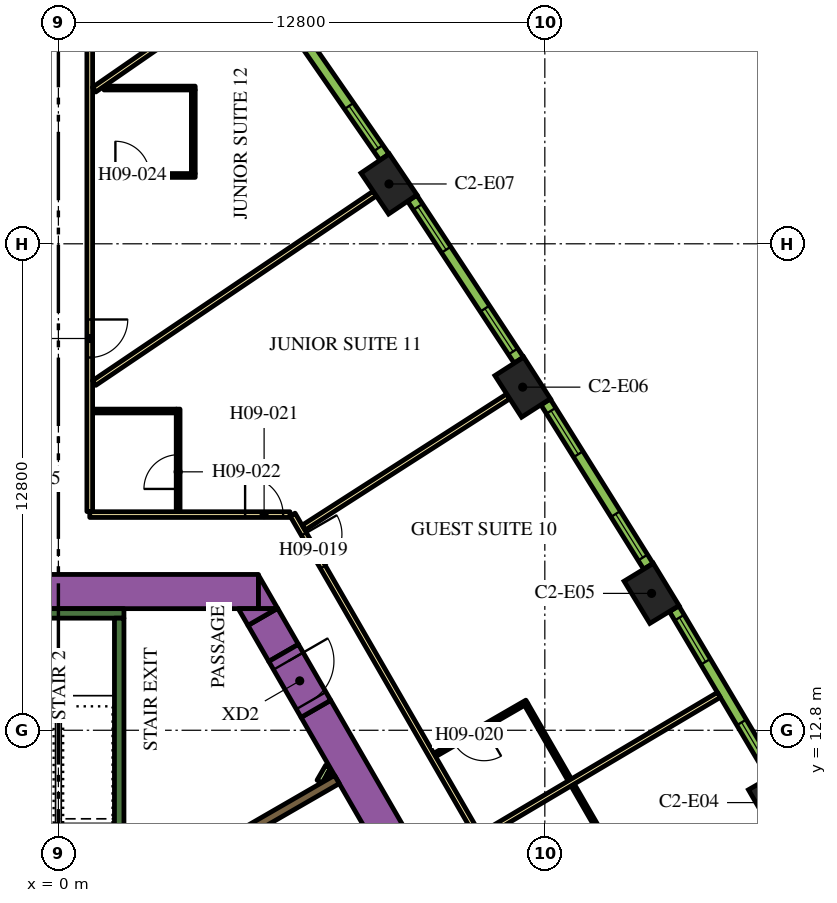
"""IFC4 building model, lengths in metres.
Left out: names, types, materials, properties, quantities, classifications, styles, units other than length and angle.
Written with IfcOpenShell. Run it as: python <this file> out.ifc"""

import sys

from ifc_helpers import new_model, si_unit, direction, frame, frame_2d, origin, origin_2d, place, context, subcontext, project, spatial, polyline, rectangle, outline, extrude, element, fill, save


model = new_model("IFC4")
c1 = context("Model", 3, precision=1e-05, world=origin(), true_north=direction((0.0, 1.0)))
c2 = subcontext(c1, "Body", "Model", "MODEL_VIEW")
j1 = project(units=[si_unit("LENGTHUNIT", "METRE"), si_unit("PLANEANGLEUNIT", "RADIAN")], contexts=[c1])
p1 = place(None, origin())
s1 = spatial("IfcSite", under=j1, at=p1, CompositionType="ELEMENT")
p2 = place(p1, origin())
s2 = spatial("IfcBuilding", under=s1, at=p2, CompositionType="ELEMENT")
p3 = place(p2, frame((0.0, 0.0, 118.8)))
s3 = spatial("IfcBuildingStorey", under=s2, at=p3, CompositionType="ELEMENT", Elevation=118.8)
for number, where, z_axis, x_axis in (
    (1, (18.874, 10.897, 0.0), (0.0, 0.0, 1.0), (-0.5, 0.866, 0.0)),
    (2, (15.609, 16.402, 0.0), (0.0, 0.0, 1.0), (-0.52, 0.854, 0.0)),
    (3, (12.217, 21.828, 0.0), (0.0, 0.0, 1.0), (-0.54, 0.842, 0.0)),
    (4, (8.699, 27.174, 0.0), (0.0, 0.0, 1.0), (-0.559, 0.829, 0.0)),
):
    element("IfcColumn", number, at=place(p3, frame(where, z_axis=z_axis, x_axis=x_axis)), inside=s3, PredefinedType="COLUMN", context=c2, shape_type="SweptSolid", body=[
        extrude(rectangle(XDim=1.3, YDim=0.9, at=origin_2d()), origin(), (0.0, 0.0, 1.0), 3.9),
    ])
p4 = place(p3, frame((6.776, 13.364, 0.0), z_axis=(0.0, 0.0, 1.0), x_axis=(0.500004177138, -0.8660229921, 0.0)))
e5 = element("IfcWall", 5, at=p4, inside=s3, PredefinedType="SOLIDWALL", context=c2, shape_type="SweptSolid", body=[
    extrude(rectangle(XDim=20.204, YDim=0.9, at=frame_2d((10.102, 0.0))), origin(), (0.0, 0.0, 1.0), 3.9),
])
p5 = place(p3, frame((-4.224, 16.45, 0.0), z_axis=(0.0, 0.0, 1.0), x_axis=(1.0, 0.0, 0.0)))
e6 = element("IfcWall", 6, at=p5, inside=s3, PredefinedType="SOLIDWALL", context=c2, shape_type="SweptSolid", body=[
    extrude(rectangle(XDim=9.488, YDim=0.9, at=frame_2d((4.744, 0.0))), origin(), (0.0, 0.0, 1.0), 3.9),
])
p6 = place(p3, origin())
e7 = element("IfcWall", 7, at=p6, inside=s3, PredefinedType="SOLIDWALL", context=c2, shape_type="SweptSolid", body=[
    extrude(outline(polyline([(5.265, 16.0), (5.265, 16.88), (5.773, 16.0), (5.265, 16.0)])), origin(), (0.0, 0.0, 1.0), 3.9),
])
p7 = place(p3, frame((5.926, 14.836, 0.0), z_axis=(0.0, 0.0, 1.0), x_axis=(-0.500076735116, 0.865981096212, 0.0)))
e8 = element("IfcWall", 8, at=p7, inside=s3, PredefinedType="SOLIDWALL", context=c2, shape_type="SweptSolid", body=[
    extrude(rectangle(XDim=1.094, YDim=0.9, at=frame_2d((0.547, 0.0))), origin(), (0.0, 0.0, 1.0), 3.9),
])
e9 = element("IfcWall", 9, at=p6, inside=s3, PredefinedType="SOLIDWALL", context=c2, shape_type="SweptSolid", body=[
    extrude(outline(polyline([(4.734, 16.0), (5.75, 16.0), (4.988, 15.56), (4.734, 16.0)])), origin(), (0.0, 0.0, 1.0), 3.9),
])
p8 = place(p3, frame((-1.725, 15.875, 0.0), z_axis=(0.0, 0.0, 1.0), x_axis=(1.0, 0.0, 0.0)))
e10 = element("IfcWall", 10, at=p8, inside=s3, PredefinedType="SOLIDWALL", context=c2, shape_type="SweptSolid", body=[
    extrude(rectangle(XDim=3.45, YDim=0.25, at=frame_2d((1.725, 0.0))), origin(), (0.0, 0.0, 1.0), 3.9),
])
p9 = place(p3, frame((1.6, 8.95, 0.0), z_axis=(0.0, 0.0, 1.0), x_axis=(0.0, 1.0, 0.0)))
e11 = element("IfcWall", 11, at=p9, inside=s3, PredefinedType="SOLIDWALL", context=c2, shape_type="SweptSolid", body=[
    extrude(rectangle(XDim=6.8, YDim=0.25, at=frame_2d((3.4, 0.0))), origin(), (0.0, 0.0, 1.0), 3.9),
])
e12 = element("IfcWall", 12, at=p6, inside=s3, PredefinedType="SOLIDWALL", context=c2, shape_type="SweptSolid", body=[
    extrude(outline(polyline([(5.27, 10.173), (5.27, 10.173), (4.683, 9.834), (4.504, 9.731), (4.442, 9.839), (4.431, 9.856), (4.419, 9.871), (4.406, 9.885), (4.39, 9.898), (4.374, 9.909), (4.357, 9.918), (4.341, 9.925), (7.266, 11.614), (7.391, 11.398), (5.486, 10.298), (5.486, 10.298), (5.27, 10.173), (5.27, 10.173)])), origin(), (0.0, 0.0, 1.0), 3.9),
])
p10 = place(p3, frame((6.872, 11.45, 0.0), z_axis=(0.0, 0.0, 1.0), x_axis=(0.499846793097, 0.866113839764, 0.0)))
e13 = element("IfcWall", 13, at=p10, inside=s3, PredefinedType="PARTITIONING", context=c2, shape_type="SweptSolid", body=[
    extrude(rectangle(XDim=0.453, YDim=0.15, at=frame_2d((0.227, 0.0))), origin(), (0.0, 0.0, 1.0), 2.75),
])
p11 = place(p3, frame((7.131, 11.6, 0.0), z_axis=(0.0, 0.0, 1.0), x_axis=(0.498600033135, 0.866832167699, 0.0)))
e14 = element("IfcWall", 14, at=p11, inside=s3, PredefinedType="PARTITIONING", context=c2, shape_type="SweptSolid", body=[
    extrude(rectangle(XDim=0.107, YDim=0.15, at=frame_2d((0.053, 0.0))), origin(), (0.0, 0.0, 1.0), 2.75),
])
p12 = place(p3, frame((5.926, 14.836, 0.0), z_axis=(0.0, 0.0, 1.0), x_axis=(0.500062241894, -0.865989465428, 0.0)))
e15 = element("IfcWall", 15, at=p12, inside=s3, PredefinedType="SOLIDWALL", context=c2, shape_type="SweptSolid", body=[
    extrude(rectangle(XDim=1.7, YDim=0.9, at=frame_2d((0.85, 0.0))), origin(), (0.0, 0.0, 1.0), 3.9),
])
p13 = place(p12, frame((0.25, 0.0, 0.0)))
e16 = element("IfcOpeningElement", 16, at=p13, cuts=e15, PredefinedType="OPENING", context=c2, shape_type="SweptSolid", body=[
    extrude(rectangle(XDim=1.2, YDim=2.1, at=frame_2d((0.6, 1.05))), frame((0.0, 0.46, 0.0), z_axis=(0.0, -1.0, 0.0), x_axis=(1.0, 0.0, 0.0)), (0.0, 0.0, 1.0), 0.92),
])
p14 = place(p3, frame((6.163, 18.475, 0.0), z_axis=(0.0, 0.0, 1.0), x_axis=(0.500001317485, -0.866024643133, 0.0)))
e17 = element("IfcWall", 17, at=p14, inside=s3, PredefinedType="PARTITIONING", context=c2, shape_type="SweptSolid", body=[
    extrude(rectangle(XDim=25.767, YDim=0.15, at=frame_2d((12.883, 0.0))), origin(), (0.0, 0.0, 1.0), 2.75),
])
p15 = place(p14, frame((19.306, 0.0, 0.0)))
e18 = element("IfcOpeningElement", 18, at=p15, cuts=e17, PredefinedType="OPENING", context=c2, shape_type="SweptSolid", body=[
    extrude(rectangle(XDim=1.0, YDim=2.1, at=frame_2d((0.5, 1.05))), frame((0.0, 0.085, 0.0), z_axis=(0.0, -1.0, 0.0), x_axis=(1.0, 0.0, 0.0)), (0.0, 0.0, 1.0), 0.17),
])
p16 = place(p14, frame((17.999, 0.0, 0.0)))
e19 = element("IfcOpeningElement", 19, at=p16, cuts=e17, PredefinedType="OPENING", context=c2, shape_type="SweptSolid", body=[
    extrude(rectangle(XDim=1.0, YDim=2.1, at=frame_2d((0.5, 1.05))), frame((0.0, 0.085, 0.0), z_axis=(0.0, -1.0, 0.0), x_axis=(1.0, 0.0, 0.0)), (0.0, 0.0, 1.0), 0.17),
])
p17 = place(p14, frame((0.596, 0.0, 0.0)))
e20 = element("IfcOpeningElement", 20, at=p17, cuts=e17, PredefinedType="OPENING", context=c2, shape_type="SweptSolid", body=[
    extrude(rectangle(XDim=1.0, YDim=2.1, at=frame_2d((0.5, 1.05))), frame((0.0, 0.085, 0.0), z_axis=(0.0, -1.0, 0.0), x_axis=(1.0, 0.0, 0.0)), (0.0, 0.0, 1.0), 0.17),
])
p18 = place(p3, frame((0.825, 18.475, 0.0), z_axis=(0.0, 0.0, 1.0), x_axis=(1.0, 0.0, 0.0)))
e21 = element("IfcWall", 21, at=p18, inside=s3, PredefinedType="PARTITIONING", context=c2, shape_type="SweptSolid", body=[
    extrude(rectangle(XDim=5.268, YDim=0.15, at=frame_2d((2.634, 0.0))), origin(), (0.0, 0.0, 1.0), 2.75),
])
p19 = place(p18, frame((4.088, 0.0, 0.0)))
e22 = element("IfcOpeningElement", 22, at=p19, cuts=e21, PredefinedType="OPENING", context=c2, shape_type="SweptSolid", body=[
    extrude(rectangle(XDim=1.0, YDim=2.1, at=frame_2d((0.5, 1.05))), frame((0.0, 0.085, 0.0), z_axis=(0.0, -1.0, 0.0), x_axis=(1.0, 0.0, 0.0)), (0.0, 0.0, 1.0), 0.17),
])
p20 = place(p3, frame((0.825, 32.098, 0.0), z_axis=(0.0, 0.0, 1.0), x_axis=(0.0, -1.0, 0.0)))
e23 = element("IfcWall", 23, at=p20, inside=s3, PredefinedType="PARTITIONING", context=c2, shape_type="SweptSolid", body=[
    extrude(rectangle(XDim=13.543, YDim=0.15, at=frame_2d((6.772, 0.0))), origin(), (0.0, 0.0, 1.0), 2.75),
])
p21 = place(p20, frame((8.49, 0.0, 0.0)))
e24 = element("IfcOpeningElement", 24, at=p21, cuts=e23, PredefinedType="OPENING", context=c2, shape_type="SweptSolid", body=[
    extrude(rectangle(XDim=1.0, YDim=2.1, at=frame_2d((0.5, 1.05))), frame((0.0, 0.085, 0.0), z_axis=(0.0, -1.0, 0.0), x_axis=(1.0, 0.0, 0.0)), (0.0, 0.0, 1.0), 0.17),
])
p22 = place(p3, frame((8.326, 26.923, 0.0), z_axis=(0.0, 0.0, 1.0), x_axis=(-0.828836601893, -0.5594907393, 0.0)))
e25 = element("IfcWall", 25, at=p22, inside=s3, PredefinedType="PARTITIONING", context=c2, shape_type="SweptSolid", body=[
    extrude(rectangle(XDim=8.909, YDim=0.15, at=frame_2d((4.455, 0.0))), origin(), (0.0, 0.0, 1.0), 2.75),
])
p23 = place(p3, frame((4.649, 32.223, 0.0), z_axis=(0.0, 0.0, 1.0), x_axis=(-0.822262349475, -0.569108626394, 0.0)))
e26 = element("IfcWall", 26, at=p23, inside=s3, PredefinedType="PARTITIONING", context=c2, shape_type="SweptSolid", body=[
    extrude(rectangle(XDim=4.51, YDim=0.15, at=frame_2d((2.255, 0.0))), origin(), (0.0, 0.0, 1.0), 2.75),
])
p24 = place(p3, frame((11.838, 21.585, 0.0), z_axis=(0.0, 0.0, 1.0), x_axis=(-0.841699322813, -0.539946525108, 0.0)))
e27 = element("IfcWall", 27, at=p24, inside=s3, PredefinedType="PARTITIONING", context=c2, shape_type="SweptSolid", body=[
    extrude(rectangle(XDim=6.392, YDim=0.15, at=frame_2d((3.196, 0.0))), origin(), (0.0, 0.0, 1.0), 2.75),
])
p25 = place(p3, frame((17.379, 13.731, 0.0), z_axis=(0.0, 0.0, 1.0), x_axis=(-0.860132461691, -0.510070728768, 0.0)))
e28 = element("IfcWall", 28, at=p25, inside=s3, PredefinedType="PARTITIONING", context=c2, shape_type="SweptSolid", body=[
    extrude(rectangle(XDim=7.257, YDim=0.15, at=frame_2d((3.628, 0.0))), origin(), (0.0, 0.0, 1.0), 2.75),
])
p26 = place(p3, frame((14.712, 9.318, 0.0), z_axis=(0.0, 0.0, 1.0), x_axis=(-0.50000006957, 0.866025363618, 0.0)))
e29 = element("IfcWall", 29, at=p26, inside=s3, PredefinedType="PARTITIONING", context=c2, shape_type="SweptSolid", body=[
    extrude(rectangle(XDim=2.36, YDim=0.1, at=frame_2d((1.18, 0.0))), origin(), (0.0, 0.0, 1.0), 2.75),
])
p27 = place(p3, frame((12.327, 13.549, 0.0), z_axis=(0.0, 0.0, 1.0), x_axis=(-0.866056369097, -0.49994636267, 0.0)))
e30 = element("IfcWall", 30, at=p27, inside=s3, PredefinedType="PARTITIONING", context=c2, shape_type="SweptSolid", body=[
    extrude(rectangle(XDim=2.8, YDim=0.1, at=frame_2d((1.4, 0.0))), origin(), (0.0, 0.0, 1.0), 2.75),
])
p28 = place(p27, frame((1.3, 0.0, 0.0)))
e31 = element("IfcOpeningElement", 31, at=p28, cuts=e30, PredefinedType="OPENING", context=c2, shape_type="SweptSolid", body=[
    extrude(rectangle(XDim=0.9, YDim=2.1, at=frame_2d((0.45, 1.05))), frame((0.0, 0.06, 0.0), z_axis=(0.0, -1.0, 0.0), x_axis=(1.0, 0.0, 0.0)), (0.0, 0.0, 1.0), 0.12),
])
p29 = place(p3, frame((12.309, 13.481, 0.0), z_axis=(0.0, 0.0, 1.0), x_axis=(0.499968531483, -0.866043571379, 0.0)))
e32 = element("IfcWall", 32, at=p29, inside=s3, PredefinedType="PARTITIONING", context=c2, shape_type="SweptSolid", body=[
    extrude(rectangle(XDim=2.29, YDim=0.1, at=frame_2d((1.145, 0.0))), origin(), (0.0, 0.0, 1.0), 2.75),
])
p30 = place(p3, frame((3.151, 18.55, 0.0), z_axis=(0.0, 0.0, 1.0), x_axis=(0.0, 1.0, 0.0)))
e33 = element("IfcWall", 33, at=p30, inside=s3, PredefinedType="PARTITIONING", context=c2, shape_type="SweptSolid", body=[
    extrude(rectangle(XDim=2.7, YDim=0.1, at=frame_2d((1.35, 0.0))), origin(), (0.0, 0.0, 1.0), 2.75),
])
p31 = place(p30, frame((0.6, 0.0, 0.0)))
e34 = element("IfcOpeningElement", 34, at=p31, cuts=e33, PredefinedType="OPENING", context=c2, shape_type="SweptSolid", body=[
    extrude(rectangle(XDim=0.9, YDim=2.1, at=frame_2d((0.45, 1.05))), frame((0.0, 0.06, 0.0), z_axis=(0.0, -1.0, 0.0), x_axis=(1.0, 0.0, 0.0)), (0.0, 0.0, 1.0), 0.12),
])
p32 = place(p3, frame((3.101, 21.2, 0.0), z_axis=(0.0, 0.0, 1.0), x_axis=(-1.0, 0.0, 0.0)))
e35 = element("IfcWall", 35, at=p32, inside=s3, PredefinedType="PARTITIONING", context=c2, shape_type="SweptSolid", body=[
    extrude(rectangle(XDim=2.2, YDim=0.1, at=frame_2d((1.1, 0.0))), origin(), (0.0, 0.0, 1.0), 2.75),
])
p33 = place(p3, frame((0.9, 27.398, 0.0), z_axis=(0.0, 0.0, 1.0), x_axis=(1.0, 0.0, 0.0)))
e36 = element("IfcWall", 36, at=p33, inside=s3, PredefinedType="PARTITIONING", context=c2, shape_type="SweptSolid", body=[
    extrude(rectangle(XDim=2.7, YDim=0.1, at=frame_2d((1.35, 0.0))), origin(), (0.0, 0.0, 1.0), 2.75),
])
p34 = place(p33, frame((0.6, 0.0, 0.0)))
e37 = element("IfcOpeningElement", 37, at=p34, cuts=e36, PredefinedType="OPENING", context=c2, shape_type="SweptSolid", body=[
    extrude(rectangle(XDim=0.9, YDim=2.1, at=frame_2d((0.45, 1.05))), frame((0.0, 0.06, 0.0), z_axis=(0.0, -1.0, 0.0), x_axis=(1.0, 0.0, 0.0)), (0.0, 0.0, 1.0), 0.12),
])
p35 = place(p3, frame((3.55, 27.448, 0.0), z_axis=(0.0, 0.0, 1.0), x_axis=(0.0, 1.0, 0.0)))
e38 = element("IfcWall", 38, at=p35, inside=s3, PredefinedType="PARTITIONING", context=c2, shape_type="SweptSolid", body=[
    extrude(rectangle(XDim=2.2, YDim=0.1, at=frame_2d((1.1, 0.0))), origin(), (0.0, 0.0, 1.0), 2.75),
])
p36 = place(p3, frame((1.2, 29.698, 0.0), z_axis=(0.0, 0.0, 1.0), x_axis=(1.0, 0.0, 0.0)))
e39 = element("IfcWall", 39, at=p36, inside=s3, PredefinedType="PARTITIONING", context=c2, shape_type="SweptSolid", body=[
    extrude(rectangle(XDim=2.4, YDim=0.1, at=frame_2d((1.2, 0.0))), origin(), (0.0, 0.0, 1.0), 2.75),
])
p37 = place(p3, frame((18.805, 11.611, 0.0), z_axis=(0.0, 0.0, 1.0), x_axis=(-0.510054281659, 0.860142214847, 0.0)))
e40 = element("IfcWall", 40, at=p37, inside=s3, PredefinedType="SOLIDWALL", context=c2, shape_type="SweptSolid", body=[
    extrude(rectangle(XDim=5.101, YDim=0.29, at=frame_2d((2.55, 0.0))), origin(), (0.0, 0.0, 1.0), 3.65),
])
p38 = place(p37, frame((0.273, 0.0, 0.9)))
e41 = element("IfcOpeningElement", 41, at=p38, cuts=e40, PredefinedType="OPENING", context=c2, shape_type="SweptSolid", body=[
    extrude(rectangle(XDim=1.35, YDim=2.15, at=frame_2d((0.675, 1.075))), frame((0.0, 0.155, 0.0), z_axis=(0.0, -1.0, 0.0), x_axis=(1.0, 0.0, 0.0)), (0.0, 0.0, 1.0), 0.31),
])
p39 = place(p37, frame((3.478, 0.0, 0.9)))
e42 = element("IfcOpeningElement", 42, at=p39, cuts=e40, PredefinedType="OPENING", context=c2, shape_type="SweptSolid", body=[
    extrude(rectangle(XDim=1.35, YDim=2.15, at=frame_2d((0.675, 1.075))), frame((0.0, 0.155, 0.0), z_axis=(0.0, -1.0, 0.0), x_axis=(1.0, 0.0, 0.0)), (0.0, 0.0, 1.0), 0.31),
])
p40 = place(p3, frame((15.524, 17.114, 0.0), z_axis=(0.0, 0.0, 1.0), x_axis=(-0.530072082134, 0.847952585787, 0.0)))
e43 = element("IfcWall", 43, at=p40, inside=s3, PredefinedType="SOLIDWALL", context=c2, shape_type="SweptSolid", body=[
    extrude(rectangle(XDim=5.1, YDim=0.29, at=frame_2d((2.55, 0.0))), origin(), (0.0, 0.0, 1.0), 3.65),
])
p41 = place(p40, frame((0.273, 0.0, 0.9)))
e44 = element("IfcOpeningElement", 44, at=p41, cuts=e43, PredefinedType="OPENING", context=c2, shape_type="SweptSolid", body=[
    extrude(rectangle(XDim=1.35, YDim=2.15, at=frame_2d((0.675, 1.075))), frame((0.0, 0.155, 0.0), z_axis=(0.0, -1.0, 0.0), x_axis=(1.0, 0.0, 0.0)), (0.0, 0.0, 1.0), 0.31),
])
p42 = place(p40, frame((3.478, 0.0, 0.9)))
e45 = element("IfcOpeningElement", 45, at=p42, cuts=e43, PredefinedType="OPENING", context=c2, shape_type="SweptSolid", body=[
    extrude(rectangle(XDim=1.35, YDim=2.15, at=frame_2d((0.675, 1.075))), frame((0.0, 0.155, 0.0), z_axis=(0.0, -1.0, 0.0), x_axis=(1.0, 0.0, 0.0)), (0.0, 0.0, 1.0), 0.31),
])
p43 = place(p3, frame((12.115, 22.539, 0.0), z_axis=(0.0, 0.0, 1.0), x_axis=(-0.549741341923, 0.835334937005, 0.0)))
e46 = element("IfcWall", 46, at=p43, inside=s3, PredefinedType="SOLIDWALL", context=c2, shape_type="SweptSolid", body=[
    extrude(rectangle(XDim=5.1, YDim=0.29, at=frame_2d((2.55, 0.0))), origin(), (0.0, 0.0, 1.0), 3.65),
])
p44 = place(p43, frame((0.273, 0.0, 0.9)))
e47 = element("IfcOpeningElement", 47, at=p44, cuts=e46, PredefinedType="OPENING", context=c2, shape_type="SweptSolid", body=[
    extrude(rectangle(XDim=1.35, YDim=2.15, at=frame_2d((0.675, 1.075))), frame((0.0, 0.155, 0.0), z_axis=(0.0, -1.0, 0.0), x_axis=(1.0, 0.0, 0.0)), (0.0, 0.0, 1.0), 0.31),
])
p45 = place(p43, frame((3.478, 0.0, 0.9)))
e48 = element("IfcOpeningElement", 48, at=p45, cuts=e46, PredefinedType="OPENING", context=c2, shape_type="SweptSolid", body=[
    extrude(rectangle(XDim=1.35, YDim=2.15, at=frame_2d((0.675, 1.075))), frame((0.0, 0.155, 0.0), z_axis=(0.0, -1.0, 0.0), x_axis=(1.0, 0.0, 0.0)), (0.0, 0.0, 1.0), 0.31),
])
p46 = place(p3, frame((8.58, 27.882, 0.0), z_axis=(0.0, 0.0, 1.0), x_axis=(-0.569113019126, 0.822259309136, 0.0)))
e49 = element("IfcWall", 49, at=p46, inside=s3, PredefinedType="SOLIDWALL", context=c2, shape_type="SweptSolid", body=[
    extrude(rectangle(XDim=5.107, YDim=0.29, at=frame_2d((2.553, 0.0))), origin(), (0.0, 0.0, 1.0), 3.65),
])
p47 = place(p46, frame((0.285, 0.0, 0.9)))
e50 = element("IfcOpeningElement", 50, at=p47, cuts=e49, PredefinedType="OPENING", context=c2, shape_type="SweptSolid", body=[
    extrude(rectangle(XDim=1.35, YDim=2.15, at=frame_2d((0.675, 1.075))), frame((0.0, 0.155, 0.0), z_axis=(0.0, -1.0, 0.0), x_axis=(1.0, 0.0, 0.0)), (0.0, 0.0, 1.0), 0.31),
])
p48 = place(p46, frame((3.516, 0.0, 0.9)))
e51 = element("IfcOpeningElement", 51, at=p48, cuts=e49, PredefinedType="OPENING", context=c2, shape_type="SweptSolid", body=[
    extrude(rectangle(XDim=1.35, YDim=2.15, at=frame_2d((0.675, 1.075))), frame((0.0, 0.155, 0.0), z_axis=(0.0, -1.0, 0.0), x_axis=(1.0, 0.0, 0.0)), (0.0, 0.0, 1.0), 0.31),
])
p49 = place(p13, origin())
e52 = element("IfcDoor", 52, at=p49, inside=s3, OperationType="SINGLE_SWING_LEFT", PredefinedType="DOOR", context=c2, shape_type="SweptSolid", body=[
    extrude(rectangle(XDim=1.2, YDim=2.1, at=frame_2d((0.6, 1.05))), frame((0.0, 0.025, 0.0), z_axis=(0.0, -1.0, 0.0), x_axis=(1.0, 0.0, 0.0)), (0.0, 0.0, 1.0), 0.05),
])
fill(e16, e52)
p50 = place(p17, origin())
e53 = element("IfcDoor", 53, at=p50, inside=s3, OperationType="SINGLE_SWING_LEFT", PredefinedType="DOOR", context=c2, shape_type="SweptSolid", body=[
    extrude(rectangle(XDim=1.0, YDim=2.1, at=frame_2d((0.5, 1.05))), frame((0.0, 0.025, 0.0), z_axis=(0.0, -1.0, 0.0), x_axis=(1.0, 0.0, 0.0)), (0.0, 0.0, 1.0), 0.05),
])
fill(e20, e53)
p51 = place(p28, origin())
e54 = element("IfcDoor", 54, at=p51, inside=s3, OperationType="SINGLE_SWING_LEFT", PredefinedType="DOOR", context=c2, shape_type="SweptSolid", body=[
    extrude(rectangle(XDim=0.9, YDim=2.1, at=frame_2d((0.45, 1.05))), frame((0.0, 0.025, 0.0), z_axis=(0.0, -1.0, 0.0), x_axis=(1.0, 0.0, 0.0)), (0.0, 0.0, 1.0), 0.05),
])
fill(e31, e54)
p52 = place(p19, origin())
e55 = element("IfcDoor", 55, at=p52, inside=s3, OperationType="SINGLE_SWING_RIGHT", PredefinedType="DOOR", context=c2, shape_type="SweptSolid", body=[
    extrude(rectangle(XDim=1.0, YDim=2.1, at=frame_2d((0.5, 1.05))), frame((0.0, 0.025, 0.0), z_axis=(0.0, -1.0, 0.0), x_axis=(1.0, 0.0, 0.0)), (0.0, 0.0, 1.0), 0.05),
])
fill(e22, e55)
p53 = place(p31, origin())
e56 = element("IfcDoor", 56, at=p53, inside=s3, OperationType="SINGLE_SWING_LEFT", PredefinedType="DOOR", context=c2, shape_type="SweptSolid", body=[
    extrude(rectangle(XDim=0.9, YDim=2.1, at=frame_2d((0.45, 1.05))), frame((0.0, 0.025, 0.0), z_axis=(0.0, -1.0, 0.0), x_axis=(1.0, 0.0, 0.0)), (0.0, 0.0, 1.0), 0.05),
])
fill(e34, e56)
p54 = place(p21, origin())
e57 = element("IfcDoor", 57, at=p54, inside=s3, OperationType="SINGLE_SWING_RIGHT", PredefinedType="DOOR", context=c2, shape_type="SweptSolid", body=[
    extrude(rectangle(XDim=1.0, YDim=2.1, at=frame_2d((0.5, 1.05))), frame((0.0, 0.025, 0.0), z_axis=(0.0, -1.0, 0.0), x_axis=(1.0, 0.0, 0.0)), (0.0, 0.0, 1.0), 0.05),
])
fill(e24, e57)
p55 = place(p34, origin())
e58 = element("IfcDoor", 58, at=p55, inside=s3, OperationType="SINGLE_SWING_RIGHT", PredefinedType="DOOR", context=c2, shape_type="SweptSolid", body=[
    extrude(rectangle(XDim=0.9, YDim=2.1, at=frame_2d((0.45, 1.05))), frame((0.0, 0.025, 0.0), z_axis=(0.0, -1.0, 0.0), x_axis=(1.0, 0.0, 0.0)), (0.0, 0.0, 1.0), 0.05),
])
fill(e37, e58)
p56 = place(p38, origin())
e59 = element("IfcWindow", 59, at=p56, inside=s3, PartitioningType="DOUBLE_PANEL_VERTICAL", PredefinedType="WINDOW", context=c2, shape_type="SweptSolid", body=[
    extrude(rectangle(XDim=1.35, YDim=2.15, at=frame_2d((0.675, 1.075))), frame((0.0, 0.015, 0.0), z_axis=(0.0, -1.0, 0.0), x_axis=(1.0, 0.0, 0.0)), (0.0, 0.0, 1.0), 0.06),
])
fill(e41, e59)
p57 = place(p39, origin())
e60 = element("IfcWindow", 60, at=p57, inside=s3, PartitioningType="DOUBLE_PANEL_VERTICAL", PredefinedType="WINDOW", context=c2, shape_type="SweptSolid", body=[
    extrude(rectangle(XDim=1.35, YDim=2.15, at=frame_2d((0.675, 1.075))), frame((0.0, 0.015, 0.0), z_axis=(0.0, -1.0, 0.0), x_axis=(1.0, 0.0, 0.0)), (0.0, 0.0, 1.0), 0.06),
])
fill(e42, e60)
p58 = place(p41, origin())
e61 = element("IfcWindow", 61, at=p58, inside=s3, PartitioningType="DOUBLE_PANEL_VERTICAL", PredefinedType="WINDOW", context=c2, shape_type="SweptSolid", body=[
    extrude(rectangle(XDim=1.35, YDim=2.15, at=frame_2d((0.675, 1.075))), frame((0.0, 0.015, 0.0), z_axis=(0.0, -1.0, 0.0), x_axis=(1.0, 0.0, 0.0)), (0.0, 0.0, 1.0), 0.06),
])
fill(e44, e61)
p59 = place(p42, origin())
e62 = element("IfcWindow", 62, at=p59, inside=s3, PartitioningType="DOUBLE_PANEL_VERTICAL", PredefinedType="WINDOW", context=c2, shape_type="SweptSolid", body=[
    extrude(rectangle(XDim=1.35, YDim=2.15, at=frame_2d((0.675, 1.075))), frame((0.0, 0.015, 0.0), z_axis=(0.0, -1.0, 0.0), x_axis=(1.0, 0.0, 0.0)), (0.0, 0.0, 1.0), 0.06),
])
fill(e45, e62)
p60 = place(p44, origin())
e63 = element("IfcWindow", 63, at=p60, inside=s3, PartitioningType="DOUBLE_PANEL_VERTICAL", PredefinedType="WINDOW", context=c2, shape_type="SweptSolid", body=[
    extrude(rectangle(XDim=1.35, YDim=2.15, at=frame_2d((0.675, 1.075))), frame((0.0, 0.015, 0.0), z_axis=(0.0, -1.0, 0.0), x_axis=(1.0, 0.0, 0.0)), (0.0, 0.0, 1.0), 0.06),
])
fill(e47, e63)
p61 = place(p45, origin())
e64 = element("IfcWindow", 64, at=p61, inside=s3, PartitioningType="DOUBLE_PANEL_VERTICAL", PredefinedType="WINDOW", context=c2, shape_type="SweptSolid", body=[
    extrude(rectangle(XDim=1.35, YDim=2.15, at=frame_2d((0.675, 1.075))), frame((0.0, 0.015, 0.0), z_axis=(0.0, -1.0, 0.0), x_axis=(1.0, 0.0, 0.0)), (0.0, 0.0, 1.0), 0.06),
])
fill(e48, e64)
p62 = place(p47, origin())
e65 = element("IfcWindow", 65, at=p62, inside=s3, PartitioningType="DOUBLE_PANEL_VERTICAL", PredefinedType="WINDOW", context=c2, shape_type="SweptSolid", body=[
    extrude(rectangle(XDim=1.35, YDim=2.15, at=frame_2d((0.675, 1.075))), frame((0.0, 0.015, 0.0), z_axis=(0.0, -1.0, 0.0), x_axis=(1.0, 0.0, 0.0)), (0.0, 0.0, 1.0), 0.06),
])
fill(e50, e65)
save(model, sys.argv[1])
